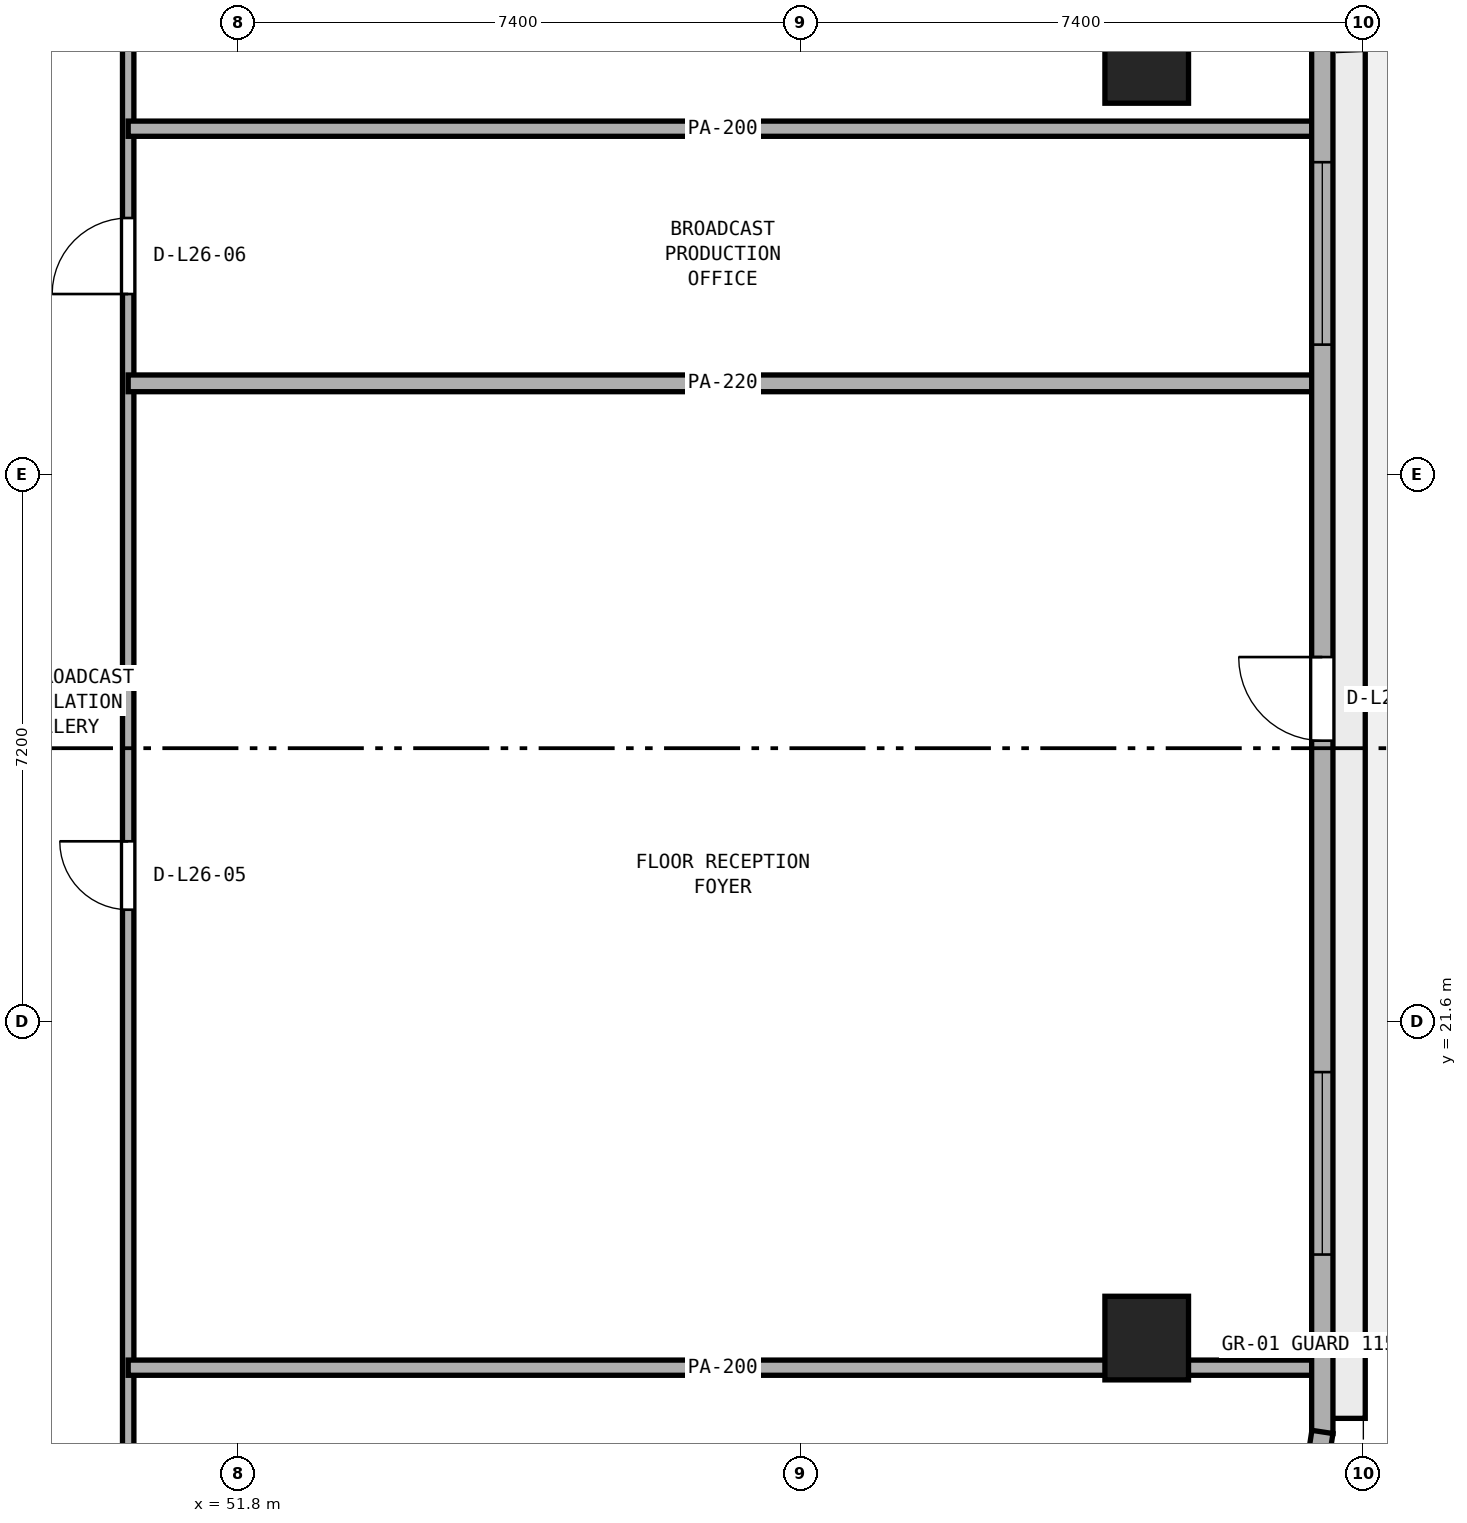
"""IFC4 building model, lengths in metres.
Left out: names, types, materials, properties, quantities, classifications, styles, units other than length and angle.
Written with IfcOpenShell. Run it as: python <this file> out.ifc"""

import sys

from ifc_helpers import new_model, si_unit, direction, frame, frame_2d, origin, origin_2d, place, context, subcontext, project, spatial, rectangle, extrude, element, fill, save


model = new_model("IFC4")
c1 = context("Model", 3, precision=1e-05, world=origin(), true_north=direction((0.0, 1.0)))
c2 = subcontext(c1, "Body", "Model", "MODEL_VIEW")
j1 = project(units=[si_unit("LENGTHUNIT", "METRE"), si_unit("PLANEANGLEUNIT", "RADIAN")], contexts=[c1])
p1 = place(None, origin())
s1 = spatial("IfcSite", under=j1, at=p1, CompositionType="ELEMENT")
p2 = place(p1, origin())
s2 = spatial("IfcBuilding", under=s1, at=p2, CompositionType="ELEMENT")
p3 = place(p2, frame((0.0, 0.0, 104.8)))
s3 = spatial("IfcBuildingStorey", under=s2, at=p3, CompositionType="ELEMENT", Elevation=104.8)
for number, where, z_axis, x_axis in (
    (1, (63.75, 17.44, 0.0), (0.0, 0.0, 1.0), (1.0, 0.0, 0.0)),
    (2, (63.75, 34.235, 0.0), (0.0, 0.0, 1.0), (1.0, 0.0, 0.0)),
):
    element("IfcColumn", number, at=place(p3, frame(where, z_axis=z_axis, x_axis=x_axis)), inside=s3, PredefinedType="COLUMN", context=c2, shape_type="SweptSolid", body=[
        extrude(rectangle(XDim=1.1, YDim=1.1, at=origin_2d()), origin(), (0.0, 0.0, 1.0), 3.8),
    ])
p4 = place(p3, frame((50.35, 15.25, 0.0), z_axis=(0.0, 0.0, 1.0), x_axis=(0.0, 1.0, 0.0)))
e3 = element("IfcWall", 3, at=p4, inside=s3, PredefinedType="PARTITIONING", context=c2, shape_type="SweptSolid", body=[
    extrude(rectangle(XDim=19.9, YDim=0.15, at=frame_2d((9.95, 0.0))), origin(), (0.0, 0.0, 1.0), 3.525),
])
p5 = place(p4, frame((7.825, 0.0, 0.0)))
e4 = element("IfcOpeningElement", 4, at=p5, cuts=e3, PredefinedType="OPENING", context=c2, shape_type="SweptSolid", body=[
    extrude(rectangle(XDim=0.9, YDim=2.1, at=frame_2d((0.45, 1.05))), frame((0.0, 0.085, 0.0), z_axis=(0.0, -1.0, 0.0), x_axis=(1.0, 0.0, 0.0)), (0.0, 0.0, 1.0), 0.17),
])
p6 = place(p4, frame((15.925, 0.0, 0.0)))
e5 = element("IfcOpeningElement", 5, at=p6, cuts=e3, PredefinedType="OPENING", context=c2, shape_type="SweptSolid", body=[
    extrude(rectangle(XDim=1.0, YDim=2.12, at=frame_2d((0.5, 1.06))), frame((0.0, 0.085, 0.0), z_axis=(0.0, -1.0, 0.0), x_axis=(1.0, 0.0, 0.0)), (0.0, 0.0, 1.0), 0.17),
])
p7 = place(p3, frame((50.35, 17.05, 0.0), z_axis=(0.0, 0.0, 1.0), x_axis=(1.0, 0.0, 0.0)))
e6 = element("IfcWall", 6, at=p7, inside=s3, PredefinedType="PARTITIONING", context=c2, shape_type="SweptSolid", body=[
    extrude(rectangle(XDim=15.645, YDim=0.2, at=frame_2d((7.823, 0.0))), origin(), (0.0, 0.0, 1.0), 3.525),
])
p8 = place(p3, frame((50.35, 30.0, 0.0), z_axis=(0.0, 0.0, 1.0), x_axis=(1.0, 0.0, 0.0)))
e7 = element("IfcWall", 7, at=p8, inside=s3, PredefinedType="PARTITIONING", context=c2, shape_type="SweptSolid", body=[
    extrude(rectangle(XDim=15.645, YDim=0.22, at=frame_2d((7.823, 0.0))), origin(), (0.0, 0.0, 1.0), 3.525),
])
p9 = place(p3, frame((50.35, 33.35, 0.0), z_axis=(0.0, 0.0, 1.0), x_axis=(1.0, 0.0, 0.0)))
e8 = element("IfcWall", 8, at=p9, inside=s3, PredefinedType="PARTITIONING", context=c2, shape_type="SweptSolid", body=[
    extrude(rectangle(XDim=15.645, YDim=0.2, at=frame_2d((7.823, 0.0))), origin(), (0.0, 0.0, 1.0), 2.908),
])
p10 = place(p3, frame((66.06, 16.183, 0.0), z_axis=(0.0, 0.0, 1.0), x_axis=(0.0, 1.0, 0.0)))
e9 = element("IfcWall", 9, at=p10, inside=s3, PredefinedType="STANDARD", context=c2, shape_type="SweptSolid", body=[
    extrude(rectangle(XDim=19.331, YDim=0.28, at=frame_2d((9.666, 0.0))), origin(), (0.0, 0.0, 1.0), 3.525),
])
p11 = place(p10, frame((9.115, 0.0, 0.0)))
e10 = element("IfcOpeningElement", 10, at=p11, cuts=e9, PredefinedType="OPENING", context=c2, shape_type="SweptSolid", body=[
    extrude(rectangle(XDim=1.1, YDim=2.2, at=frame_2d((0.55, 1.1))), frame((0.0, 0.15, 0.0), z_axis=(0.0, -1.0, 0.0), x_axis=(1.0, 0.0, 0.0)), (0.0, 0.0, 1.0), 0.3),
])
p12 = place(p10, frame((2.355, 0.0, 0.9)))
e11 = element("IfcOpeningElement", 11, at=p12, cuts=e9, PredefinedType="OPENING", context=c2, shape_type="SweptSolid", body=[
    extrude(rectangle(XDim=2.4, YDim=1.75, at=frame_2d((1.2, 0.875))), frame((0.0, 0.15, 0.0), z_axis=(0.0, -1.0, 0.0), x_axis=(1.0, 0.0, 0.0)), (0.0, 0.0, 1.0), 0.3),
])
p13 = place(p10, frame((14.326, 0.0, 0.9)))
e12 = element("IfcOpeningElement", 12, at=p13, cuts=e9, PredefinedType="OPENING", context=c2, shape_type="SweptSolid", body=[
    extrude(rectangle(XDim=2.4, YDim=1.75, at=frame_2d((1.2, 0.875))), frame((0.0, 0.15, 0.0), z_axis=(0.0, -1.0, 0.0), x_axis=(1.0, 0.0, 0.0)), (0.0, 0.0, 1.0), 0.3),
])
p14 = place(p3, frame((65.867, 14.943, 0.0), z_axis=(0.0, 0.0, 1.0), x_axis=(0.152014078361, 0.988378328364, 0.0)))
e13 = element("IfcWall", 13, at=p14, inside=s3, PredefinedType="STANDARD", context=c2, shape_type="SweptSolid", body=[
    extrude(rectangle(XDim=1.277, YDim=0.28, at=frame_2d((0.638, 0.0))), origin(), (0.0, 0.0, 1.0), 3.525),
])
p15 = place(p5, origin())
e14 = element("IfcDoor", 14, at=p15, inside=s3, OperationType="SINGLE_SWING_RIGHT", PredefinedType="DOOR", context=c2, shape_type="SweptSolid", body=[
    extrude(rectangle(XDim=0.9, YDim=2.1, at=frame_2d((0.45, 1.05))), frame((0.0, 0.025, 0.0), z_axis=(0.0, -1.0, 0.0), x_axis=(1.0, 0.0, 0.0)), (0.0, 0.0, 1.0), 0.05),
])
fill(e4, e14)
p16 = place(p6, origin())
e15 = element("IfcDoor", 15, at=p16, inside=s3, OperationType="SINGLE_SWING_LEFT", PredefinedType="DOOR", context=c2, shape_type="SweptSolid", body=[
    extrude(rectangle(XDim=1.0, YDim=2.12, at=frame_2d((0.5, 1.06))), frame((0.0, 0.025, 0.0), z_axis=(0.0, -1.0, 0.0), x_axis=(1.0, 0.0, 0.0)), (0.0, 0.0, 1.0), 0.05),
])
fill(e5, e15)
p17 = place(p11, origin())
e16 = element("IfcDoor", 16, at=p17, inside=s3, OperationType="SINGLE_SWING_RIGHT", PredefinedType="DOOR", context=c2, shape_type="SweptSolid", body=[
    extrude(rectangle(XDim=1.1, YDim=2.2, at=frame_2d((0.55, 1.1))), frame((0.0, 0.025, 0.0), z_axis=(0.0, -1.0, 0.0), x_axis=(1.0, 0.0, 0.0)), (0.0, 0.0, 1.0), 0.05),
])
fill(e10, e16)
p18 = place(p12, origin())
e17 = element("IfcWindow", 17, at=p18, inside=s3, PartitioningType="SINGLE_PANEL", PredefinedType="WINDOW", context=c2, shape_type="SweptSolid", body=[
    extrude(rectangle(XDim=2.4, YDim=1.75, at=frame_2d((1.2, 0.875))), frame((0.0, 0.03, 0.0), z_axis=(0.0, -1.0, 0.0), x_axis=(1.0, 0.0, 0.0)), (0.0, 0.0, 1.0), 0.06),
])
fill(e11, e17)
p19 = place(p13, origin())
e18 = element("IfcWindow", 18, at=p19, inside=s3, PartitioningType="SINGLE_PANEL", PredefinedType="WINDOW", context=c2, shape_type="SweptSolid", body=[
    extrude(rectangle(XDim=2.4, YDim=1.75, at=frame_2d((1.2, 0.875))), frame((0.0, 0.03, 0.0), z_axis=(0.0, -1.0, 0.0), x_axis=(1.0, 0.0, 0.0)), (0.0, 0.0, 1.0), 0.06),
])
fill(e12, e18)
save(model, sys.argv[1])
